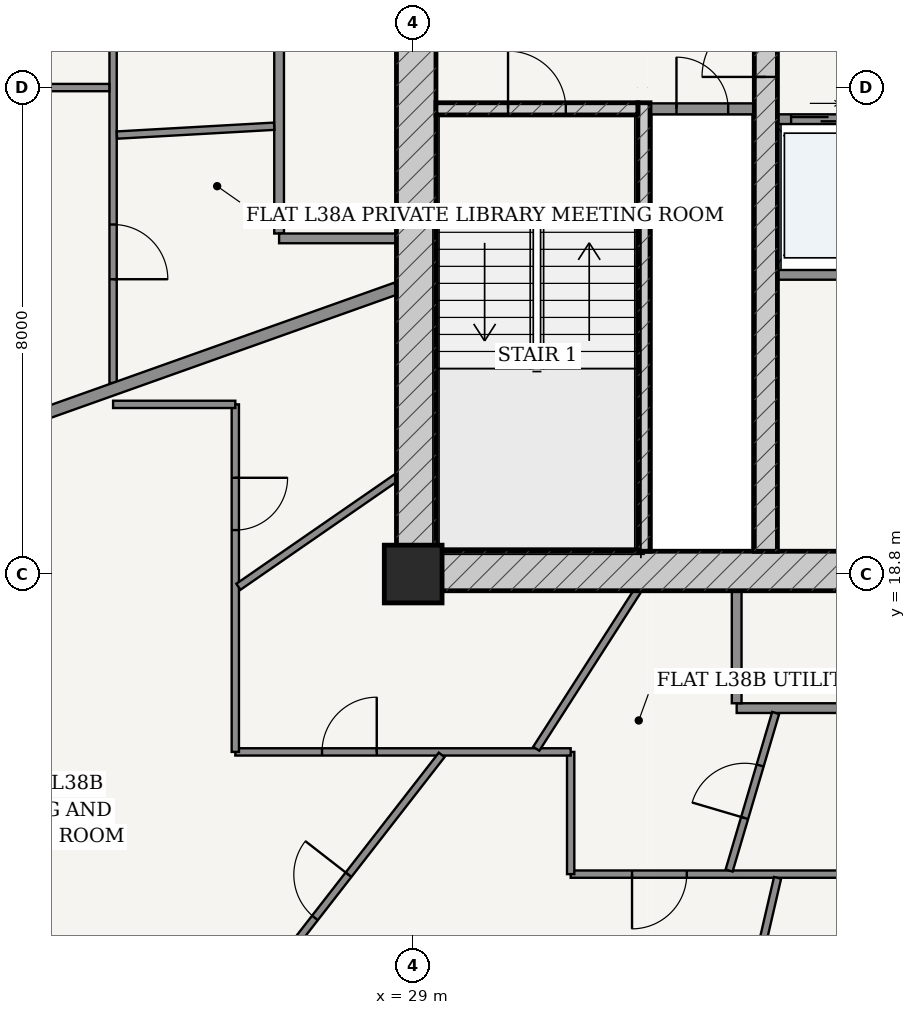
"""IFC4 building model, lengths in metres.
Left out: names, types, materials, properties, quantities, classifications, styles, units other than length and angle.
Written with IfcOpenShell. Run it as: python <this file> out.ifc"""

import sys

from ifc_helpers import new_model, si_unit, direction, frame, frame_2d, origin, origin_2d, place, context, subcontext, project, spatial, rectangle, extrude, source, transform, mapped, element, fill, save


model = new_model("IFC4")
c1 = context("Model", 3, precision=1e-05, world=origin(), true_north=direction((-0.2419218956, 0.970295726276)))
c2 = subcontext(c1, "Body", "Model", "MODEL_VIEW")
j1 = project(units=[si_unit("LENGTHUNIT", "METRE"), si_unit("PLANEANGLEUNIT", "RADIAN")], contexts=[c1])
p1 = place(None, origin())
s1 = spatial("IfcSite", under=j1, at=p1, CompositionType="ELEMENT")
p2 = place(p1, origin())
s2 = spatial("IfcBuilding", under=s1, at=p2, CompositionType="ELEMENT")
p3 = place(p2, frame((0.0, 0.0, 146.2)))
s3 = spatial("IfcBuildingStorey", under=s2, at=p3, CompositionType="ELEMENT", Elevation=146.2)
p4 = place(p3, frame((29.0, 18.8, 0.0), z_axis=(0.0, 0.0, 1.0), x_axis=(1.0, 0.0, 0.0)))
e1 = element("IfcColumn", 1, at=p4, inside=s3, PredefinedType="COLUMN", context=c2, shape_type="SweptSolid", body=[
    extrude(rectangle(XDim=0.95, YDim=0.95, at=origin_2d()), origin(), (0.0, 0.0, 1.0), 3.6),
])
p5 = place(p3, frame((28.725, 18.85, 0.0), z_axis=(0.0, 0.0, 1.0), x_axis=(1.0, 0.0, 0.0)))
e2 = element("IfcWall", 2, at=p5, inside=s3, PredefinedType="SHEAR", context=c2, shape_type="SweptSolid", body=[
    extrude(rectangle(XDim=18.55, YDim=0.65, at=frame_2d((9.275, 0.0))), origin(), (0.0, 0.0, 1.0), 3.33),
])
p6 = place(p5, frame((7.51, 0.0, 0.0)))
e3 = element("IfcOpeningElement", 3, at=p6, cuts=e2, PredefinedType="OPENING", context=c2, shape_type="SweptSolid", body=[
    extrude(rectangle(XDim=0.85, YDim=2.1, at=frame_2d((0.425, 1.05))), frame((0.0, 0.335, 0.0), z_axis=(0.0, -1.0, 0.0), x_axis=(1.0, 0.0, 0.0)), (0.0, 0.0, 1.0), 0.67),
])
p7 = place(p5, frame((10.59, 0.0, 0.0)))
e4 = element("IfcOpeningElement", 4, at=p7, cuts=e2, PredefinedType="OPENING", context=c2, shape_type="SweptSolid", body=[
    extrude(rectangle(XDim=0.85, YDim=2.1, at=frame_2d((0.425, 1.05))), frame((0.0, 0.335, 0.0), z_axis=(0.0, -1.0, 0.0), x_axis=(1.0, 0.0, 0.0)), (0.0, 0.0, 1.0), 0.67),
])
p8 = place(p3, frame((29.05, 19.175, 0.0), z_axis=(0.0, 0.0, 1.0), x_axis=(0.0, 1.0, 0.0)))
e5 = element("IfcWall", 5, at=p8, inside=s3, PredefinedType="SHEAR", context=c2, shape_type="SweptSolid", body=[
    extrude(rectangle(XDim=15.25, YDim=0.65, at=frame_2d((7.625, 0.0))), origin(), (0.0, 0.0, 1.0), 3.33),
])
p9 = place(p8, frame((9.875, 0.0, 0.0)))
e6 = element("IfcOpeningElement", 6, at=p9, cuts=e5, PredefinedType="OPENING", context=c2, shape_type="SweptSolid", body=[
    extrude(rectangle(XDim=1.5, YDim=2.2, at=frame_2d((0.75, 1.1))), frame((0.0, 0.335, 0.0), z_axis=(0.0, -1.0, 0.0), x_axis=(1.0, 0.0, 0.0)), (0.0, 0.0, 1.0), 0.67),
])
p10 = place(p3, frame((32.795, 19.175, 0.0), z_axis=(0.0, 0.0, 1.0), x_axis=(0.0, 1.0, 0.0)))
e7 = element("IfcWall", 7, at=p10, inside=s3, PredefinedType="SOLIDWALL", context=c2, shape_type="SweptSolid", body=[
    extrude(rectangle(XDim=7.375, YDim=0.2, at=frame_2d((3.688, 0.0))), origin(), (0.0, 0.0, 1.0), 3.33),
])
p11 = place(p3, frame((29.375, 26.45, 0.0), z_axis=(0.0, 0.0, 1.0), x_axis=(1.0, 0.0, 0.0)))
e8 = element("IfcWall", 8, at=p11, inside=s3, PredefinedType="SOLIDWALL", context=c2, shape_type="SweptSolid", body=[
    extrude(rectangle(XDim=3.32, YDim=0.2, at=frame_2d((1.66, 0.0))), origin(), (0.0, 0.0, 1.0), 3.33),
])
p12 = place(p11, frame((1.185, 0.0, 0.0)))
e9 = element("IfcOpeningElement", 9, at=p12, cuts=e8, PredefinedType="OPENING", context=c2, shape_type="SweptSolid", body=[
    extrude(rectangle(XDim=0.95, YDim=2.15, at=frame_2d((0.475, 1.075))), frame((0.0, 0.11, 0.0), z_axis=(0.0, -1.0, 0.0), x_axis=(1.0, 0.0, 0.0)), (0.0, 0.0, 1.0), 0.22),
])
p13 = place(p3, frame((34.8, 19.175, 0.0), z_axis=(0.0, 0.0, 1.0), x_axis=(0.0, 1.0, 0.0)))
e10 = element("IfcWall", 10, at=p13, inside=s3, PredefinedType="SHEAR", context=c2, shape_type="SweptSolid", body=[
    extrude(rectangle(XDim=15.25, YDim=0.38, at=frame_2d((7.625, 0.0))), origin(), (0.0, 0.0, 1.0), 3.33),
])
p14 = place(p13, frame((7.8, 0.0, 0.0)))
e11 = element("IfcOpeningElement", 11, at=p14, cuts=e10, PredefinedType="OPENING", context=c2, shape_type="SweptSolid", body=[
    extrude(rectangle(XDim=1.05, YDim=2.15, at=frame_2d((0.525, 1.075))), frame((0.0, 0.2, 0.0), z_axis=(0.0, -1.0, 0.0), x_axis=(1.0, 0.0, 0.0)), (0.0, 0.0, 1.0), 0.4),
])
p15 = place(p3, frame((32.9, 26.45, 0.0), z_axis=(0.0, 0.0, 1.0), x_axis=(1.0, 0.0, 0.0)))
e12 = element("IfcWall", 12, at=p15, inside=s3, PredefinedType="PARTITIONING", context=c2, shape_type="SweptSolid", body=[
    extrude(rectangle(XDim=1.71, YDim=0.18, at=frame_2d((0.855, 0.0))), origin(), (0.0, 0.0, 1.0), 3.33),
])
p16 = place(p15, frame((0.43, 0.0, 0.0)))
e13 = element("IfcOpeningElement", 13, at=p16, cuts=e12, PredefinedType="OPENING", context=c2, shape_type="SweptSolid", body=[
    extrude(rectangle(XDim=0.85, YDim=2.1, at=frame_2d((0.425, 1.05))), frame((0.0, 0.1, 0.0), z_axis=(0.0, -1.0, 0.0), x_axis=(1.0, 0.0, 0.0)), (0.0, 0.0, 1.0), 0.2),
])
p17 = place(p3, frame((34.99, 26.28, 0.0), z_axis=(0.0, 0.0, 1.0), x_axis=(1.0, 0.0, 0.0)))
e14 = element("IfcWall", 14, at=p17, inside=s3, PredefinedType="PARTITIONING", context=c2, shape_type="SweptSolid", body=[
    extrude(rectangle(XDim=6.02, YDim=0.16, at=frame_2d((3.01, 0.0))), origin(), (0.0, 0.0, 1.0), 3.33),
])
p18 = place(p17, frame((0.225, 0.0, 0.0)))
e15 = element("IfcOpeningElement", 15, at=p18, cuts=e14, PredefinedType="OPENING", context=c2, shape_type="SweptSolid", body=[
    extrude(rectangle(XDim=1.1, YDim=2.2, at=frame_2d((0.55, 1.1))), frame((0.0, 0.09, 0.0), z_axis=(0.0, -1.0, 0.0), x_axis=(1.0, 0.0, 0.0)), (0.0, 0.0, 1.0), 0.18),
])
p19 = place(p17, frame((1.705, 0.0, 0.0)))
e16 = element("IfcOpeningElement", 16, at=p19, cuts=e14, PredefinedType="OPENING", context=c2, shape_type="SweptSolid", body=[
    extrude(rectangle(XDim=1.1, YDim=2.2, at=frame_2d((0.55, 1.1))), frame((0.0, 0.09, 0.0), z_axis=(0.0, -1.0, 0.0), x_axis=(1.0, 0.0, 0.0)), (0.0, 0.0, 1.0), 0.18),
])
p20 = place(p3, frame((34.99, 23.72, 0.0), z_axis=(0.0, 0.0, 1.0), x_axis=(1.0, 0.0, 0.0)))
e17 = element("IfcWall", 17, at=p20, inside=s3, PredefinedType="PARTITIONING", context=c2, shape_type="SweptSolid", body=[
    extrude(rectangle(XDim=6.02, YDim=0.16, at=frame_2d((3.01, 0.0))), origin(), (0.0, 0.0, 1.0), 3.33),
])
p21 = place(p3, frame((26.795, 24.4, 0.0), z_axis=(0.0, 0.0, 1.0), x_axis=(0.0, 1.0, 0.0)))
e18 = element("IfcWall", 18, at=p21, inside=s3, PredefinedType="PARTITIONING", context=c2, shape_type="SweptSolid", body=[
    extrude(rectangle(XDim=10.675, YDim=0.16, at=frame_2d((5.337, 0.0))), origin(), (0.0, 0.0, 1.0), 2.776),
])
p22 = place(p21, frame((6.702, 0.0, 0.0)))
e19 = element("IfcOpeningElement", 19, at=p22, cuts=e18, PredefinedType="OPENING", context=c2, shape_type="SweptSolid", body=[
    extrude(rectangle(XDim=0.98, YDim=2.2, at=frame_2d((0.49, 1.1))), frame((0.0, 0.09, 0.0), z_axis=(0.0, -1.0, 0.0), x_axis=(1.0, 0.0, 0.0)), (0.0, 0.0, 1.0), 0.18),
])
p23 = place(p3, frame((26.795, 24.32, 0.0), z_axis=(0.0, 0.0, 1.0), x_axis=(1.0, 0.0, 0.0)))
e20 = element("IfcWall", 20, at=p23, inside=s3, PredefinedType="PARTITIONING", context=c2, shape_type="SweptSolid", body=[
    extrude(rectangle(XDim=1.93, YDim=0.16, at=frame_2d((0.965, 0.0))), origin(), (0.0, 0.0, 1.0), 3.33),
])
p24 = place(p3, frame((34.32, 16.595, 0.0), z_axis=(0.0, 0.0, 1.0), x_axis=(1.0, 0.0, 0.0)))
e21 = element("IfcWall", 21, at=p24, inside=s3, PredefinedType="PARTITIONING", context=c2, shape_type="SweptSolid", body=[
    extrude(rectangle(XDim=14.885, YDim=0.16, at=frame_2d((7.442, 0.0))), origin(), (0.0, 0.0, 1.0), 2.776),
])
p25 = place(p24, frame((11.609, 0.0, 0.0)))
e22 = element("IfcOpeningElement", 22, at=p25, cuts=e21, PredefinedType="OPENING", context=c2, shape_type="SweptSolid", body=[
    extrude(rectangle(XDim=0.98, YDim=2.2, at=frame_2d((0.49, 1.1))), frame((0.0, 0.09, 0.0), z_axis=(0.0, -1.0, 0.0), x_axis=(1.0, 0.0, 0.0)), (0.0, 0.0, 1.0), 0.18),
])
p26 = place(p3, frame((34.32, 16.675, 0.0), z_axis=(0.0, 0.0, 1.0), x_axis=(0.0, 1.0, 0.0)))
e23 = element("IfcWall", 23, at=p26, inside=s3, PredefinedType="PARTITIONING", context=c2, shape_type="SweptSolid", body=[
    extrude(rectangle(XDim=1.85, YDim=0.16, at=frame_2d((0.925, 0.0))), origin(), (0.0, 0.0, 1.0), 3.33),
])
p27 = place(p3, frame((24.065, 21.941, 0.0), z_axis=(0.0, 0.0, 1.0), x_axis=(0.0, 1.0, 0.0)))
e24 = element("IfcWall", 24, at=p27, inside=s3, PredefinedType="PARTITIONING", context=c2, shape_type="SweptSolid", body=[
    extrude(rectangle(XDim=15.944, YDim=0.12, at=frame_2d((7.972, 0.0))), origin(), (0.0, 0.0, 1.0), 2.776),
])
p28 = place(p27, frame((5.602, 0.0, 0.0)))
e25 = element("IfcOpeningElement", 25, at=p28, cuts=e24, PredefinedType="OPENING", context=c2, shape_type="SweptSolid", body=[
    extrude(rectangle(XDim=0.9, YDim=2.15, at=frame_2d((0.45, 1.075))), frame((0.0, 0.07, 0.0), z_axis=(0.0, -1.0, 0.0), x_axis=(1.0, 0.0, 0.0)), (0.0, 0.0, 1.0), 0.14),
])
p29 = place(p27, frame((1.707, 0.0, 0.0)))
e26 = element("IfcOpeningElement", 26, at=p29, cuts=e24, PredefinedType="OPENING", context=c2, shape_type="SweptSolid", body=[
    extrude(rectangle(XDim=0.9, YDim=2.15, at=frame_2d((0.45, 1.075))), frame((0.0, 0.07, 0.0), z_axis=(0.0, -1.0, 0.0), x_axis=(1.0, 0.0, 0.0)), (0.0, 0.0, 1.0), 0.14),
])
p30 = place(p27, frame((11.402, 0.0, 0.0)))
e27 = element("IfcOpeningElement", 27, at=p30, cuts=e24, PredefinedType="OPENING", context=c2, shape_type="SweptSolid", body=[
    extrude(rectangle(XDim=0.9, YDim=2.15, at=frame_2d((0.45, 1.075))), frame((0.0, 0.07, 0.0), z_axis=(0.0, -1.0, 0.0), x_axis=(1.0, 0.0, 0.0)), (0.0, 0.0, 1.0), 0.14),
])
p31 = place(p3, frame((24.003, 26.8, 0.0), z_axis=(0.0, 0.0, 1.0), x_axis=(-1.0, 0.0, 0.0)))
e28 = element("IfcWall", 28, at=p31, inside=s3, PredefinedType="PARTITIONING", context=c2, shape_type="SweptSolid", body=[
    extrude(rectangle(XDim=10.143, YDim=0.12, at=frame_2d((5.071, 0.0))), origin(), (0.0, 0.0, 1.0), 2.846),
])
p32 = place(p31, frame((4.622, 0.0, 0.0)))
e29 = element("IfcOpeningElement", 29, at=p32, cuts=e28, PredefinedType="OPENING", context=c2, shape_type="SweptSolid", body=[
    extrude(rectangle(XDim=0.9, YDim=2.15, at=frame_2d((0.45, 1.075))), frame((0.0, 0.07, 0.0), z_axis=(0.0, -1.0, 0.0), x_axis=(1.0, 0.0, 0.0)), (0.0, 0.0, 1.0), 0.14),
])
p33 = place(p3, frame((26.715, 26.164, 0.0), z_axis=(0.0, 0.0, 1.0), x_axis=(-0.998418047295, -0.056226353574, 0.0)))
e30 = element("IfcWall", 30, at=p33, inside=s3, PredefinedType="PARTITIONING", context=c2, shape_type="SweptSolid", body=[
    extrude(rectangle(XDim=2.592, YDim=0.12, at=frame_2d((1.296, 0.0))), origin(), (0.0, 0.0, 1.0), 3.33),
])
p34 = place(p3, frame((28.723, 23.497, 0.0), z_axis=(0.0, 0.0, 1.0), x_axis=(-0.942077095572, -0.335396401292, 0.0)))
e31 = element("IfcWall", 31, at=p34, inside=s3, PredefinedType="PARTITIONING", context=c2, shape_type="SweptSolid", body=[
    extrude(rectangle(XDim=13.823, YDim=0.2, at=frame_2d((6.912, 0.0))), origin(), (0.0, 0.0, 1.0), 2.846),
])
p35 = place(p3, frame((51.935, 13.865, 0.0), z_axis=(0.0, 0.0, 1.0), x_axis=(-1.0, 0.0, 0.0)))
e32 = element("IfcWall", 32, at=p35, inside=s3, PredefinedType="PARTITIONING", context=c2, shape_type="SweptSolid", body=[
    extrude(rectangle(XDim=20.345, YDim=0.12, at=frame_2d((10.172, 0.0))), origin(), (0.0, 0.0, 1.0), 2.776),
])
p36 = place(p35, frame((2.985, 0.0, 0.0)))
e33 = element("IfcOpeningElement", 33, at=p36, cuts=e32, PredefinedType="OPENING", context=c2, shape_type="SweptSolid", body=[
    extrude(rectangle(XDim=0.9, YDim=2.15, at=frame_2d((0.45, 1.075))), frame((0.0, 0.07, 0.0), z_axis=(0.0, -1.0, 0.0), x_axis=(1.0, 0.0, 0.0)), (0.0, 0.0, 1.0), 0.14),
])
p37 = place(p35, frame((12.333, 0.0, 0.0)))
e34 = element("IfcOpeningElement", 34, at=p37, cuts=e32, PredefinedType="OPENING", context=c2, shape_type="SweptSolid", body=[
    extrude(rectangle(XDim=0.9, YDim=2.15, at=frame_2d((0.45, 1.075))), frame((0.0, 0.07, 0.0), z_axis=(0.0, -1.0, 0.0), x_axis=(1.0, 0.0, 0.0)), (0.0, 0.0, 1.0), 0.14),
])
p38 = place(p35, frame((18.436, 0.0, 0.0)))
e35 = element("IfcOpeningElement", 35, at=p38, cuts=e32, PredefinedType="OPENING", context=c2, shape_type="SweptSolid", body=[
    extrude(rectangle(XDim=0.9, YDim=2.15, at=frame_2d((0.45, 1.075))), frame((0.0, 0.07, 0.0), z_axis=(0.0, -1.0, 0.0), x_axis=(1.0, 0.0, 0.0)), (0.0, 0.0, 1.0), 0.14),
])
p39 = place(p3, frame((31.59, 13.865, 0.0), z_axis=(0.0, 0.0, 1.0), x_axis=(0.0, 1.0, 0.0)))
e36 = element("IfcWall", 36, at=p39, inside=s3, PredefinedType="PARTITIONING", context=c2, shape_type="SweptSolid", body=[
    extrude(rectangle(XDim=2.01, YDim=0.12, at=frame_2d((1.005, 0.0))), origin(), (0.0, 0.0, 1.0), 3.005),
])
p40 = place(p3, frame((31.59, 15.875, 0.0), z_axis=(0.0, 0.0, 1.0), x_axis=(-1.0, 0.0, 0.0)))
e37 = element("IfcWall", 37, at=p40, inside=s3, PredefinedType="PARTITIONING", context=c2, shape_type="SweptSolid", body=[
    extrude(rectangle(XDim=5.515, YDim=0.12, at=frame_2d((2.758, 0.0))), origin(), (0.0, 0.0, 1.0), 2.776),
])
p41 = place(p40, frame((3.189, 0.0, 0.0)))
e38 = element("IfcOpeningElement", 38, at=p41, cuts=e37, PredefinedType="OPENING", context=c2, shape_type="SweptSolid", body=[
    extrude(rectangle(XDim=0.9, YDim=2.15, at=frame_2d((0.45, 1.075))), frame((0.0, 0.07, 0.0), z_axis=(0.0, -1.0, 0.0), x_axis=(1.0, 0.0, 0.0)), (0.0, 0.0, 1.0), 0.14),
])
p42 = place(p3, frame((26.075, 15.875, 0.0), z_axis=(0.0, 0.0, 1.0), x_axis=(0.0, 1.0, 0.0)))
e39 = element("IfcWall", 39, at=p42, inside=s3, PredefinedType="PARTITIONING", context=c2, shape_type="SweptSolid", body=[
    extrude(rectangle(XDim=5.715, YDim=0.12, at=frame_2d((2.857, 0.0))), origin(), (0.0, 0.0, 1.0), 2.776),
])
p43 = place(p42, frame((3.648, 0.0, 0.0)))
e40 = element("IfcOpeningElement", 40, at=p43, cuts=e39, PredefinedType="OPENING", context=c2, shape_type="SweptSolid", body=[
    extrude(rectangle(XDim=0.86, YDim=2.15, at=frame_2d((0.43, 1.075))), frame((0.0, 0.07, 0.0), z_axis=(0.0, -1.0, 0.0), x_axis=(1.0, 0.0, 0.0)), (0.0, 0.0, 1.0), 0.14),
])
p44 = place(p3, frame((26.075, 21.59, 0.0), z_axis=(0.0, 0.0, 1.0), x_axis=(-1.0, 0.0, 0.0)))
e41 = element("IfcWall", 41, at=p44, inside=s3, PredefinedType="PARTITIONING", context=c2, shape_type="SweptSolid", body=[
    extrude(rectangle(XDim=2.01, YDim=0.12, at=frame_2d((1.005, 0.0))), origin(), (0.0, 0.0, 1.0), 3.33),
])
p45 = place(p3, frame((29.469, 15.826, 0.0), z_axis=(0.0, 0.0, 1.0), x_axis=(-0.61373942367, -0.789508657225, 0.0)))
e42 = element("IfcWall", 42, at=p45, inside=s3, PredefinedType="PARTITIONING", context=c2, shape_type="SweptSolid", body=[
    extrude(rectangle(XDim=7.898, YDim=0.12, at=frame_2d((3.949, 0.0))), origin(), (0.0, 0.0, 1.0), 2.776),
])
p46 = place(p45, frame((2.496, 0.0, 0.0)))
e43 = element("IfcOpeningElement", 43, at=p46, cuts=e42, PredefinedType="OPENING", context=c2, shape_type="SweptSolid", body=[
    extrude(rectangle(XDim=0.9, YDim=2.15, at=frame_2d((0.45, 1.075))), frame((0.0, 0.07, 0.0), z_axis=(0.0, -1.0, 0.0), x_axis=(1.0, 0.0, 0.0)), (0.0, 0.0, 1.0), 0.14),
])
p47 = place(p3, frame((34.992, 13.805, 0.0), z_axis=(0.0, 0.0, 1.0), x_axis=(-0.225447000045, -0.974255433739, 0.0)))
e44 = element("IfcWall", 44, at=p47, inside=s3, PredefinedType="PARTITIONING", context=c2, shape_type="SweptSolid", body=[
    extrude(rectangle(XDim=7.496, YDim=0.12, at=frame_2d((3.748, 0.0))), origin(), (0.0, 0.0, 1.0), 2.776),
])
p48 = place(p3, frame((28.723, 20.386, 0.0), z_axis=(0.0, 0.0, 1.0), x_axis=(-0.822570551556, -0.568663070467, 0.0)))
e45 = element("IfcWall", 45, at=p48, inside=s3, PredefinedType="PARTITIONING", context=c2, shape_type="SweptSolid", body=[
    extrude(rectangle(XDim=3.158, YDim=0.12, at=frame_2d((1.579, 0.0))), origin(), (0.0, 0.0, 1.0), 3.33),
])
p49 = place(p3, frame((32.691, 18.525, 0.0), z_axis=(0.0, 0.0, 1.0), x_axis=(-0.54002976428, -0.841645919429, 0.0)))
e46 = element("IfcWall", 46, at=p49, inside=s3, PredefinedType="PARTITIONING", context=c2, shape_type="SweptSolid", body=[
    extrude(rectangle(XDim=3.086, YDim=0.12, at=frame_2d((1.543, 0.0))), origin(), (0.0, 0.0, 1.0), 3.33),
])
p50 = place(p3, frame((34.961, 16.515, 0.0), z_axis=(0.0, 0.0, 1.0), x_axis=(-0.283365034326, -0.959012125743, 0.0)))
e47 = element("IfcWall", 47, at=p50, inside=s3, PredefinedType="PARTITIONING", context=c2, shape_type="SweptSolid", body=[
    extrude(rectangle(XDim=2.701, YDim=0.12, at=frame_2d((1.351, 0.0))), origin(), (0.0, 0.0, 1.0), 3.33),
])
p51 = place(p50, frame((0.901, 0.0, 0.0)))
e48 = element("IfcOpeningElement", 48, at=p51, cuts=e47, PredefinedType="OPENING", context=c2, shape_type="SweptSolid", body=[
    extrude(rectangle(XDim=0.9, YDim=2.15, at=frame_2d((0.45, 1.075))), frame((0.0, 0.07, 0.0), z_axis=(0.0, -1.0, 0.0), x_axis=(1.0, 0.0, 0.0)), (0.0, 0.0, 1.0), 0.14),
])
m1 = source(origin(), c2, "Body", "SweptSolid", [
    extrude(rectangle(XDim=1.05, YDim=2.15, at=frame_2d((0.525, 1.075))), frame((0.0, 0.025, 0.0), z_axis=(0.0, -1.0, 0.0), x_axis=(1.0, 0.0, 0.0)), (0.0, 0.0, 1.0), 0.05),
])
p52 = place(p14, origin())
e49 = element("IfcDoor", 49, at=p52, inside=s3, OperationType="SINGLE_SWING_LEFT", PredefinedType="DOOR", context=c2, shape_type="MappedRepresentation", body=[
    mapped(m1, transform((0.0, 0.0, 0.0), scale=1.0)),
])
fill(e11, e49)
m2 = source(origin(), c2, "Body", "SweptSolid", [
    extrude(rectangle(XDim=0.95, YDim=2.15, at=frame_2d((0.475, 1.075))), frame((0.0, 0.025, 0.0), z_axis=(0.0, -1.0, 0.0), x_axis=(1.0, 0.0, 0.0)), (0.0, 0.0, 1.0), 0.05),
])
p53 = place(p12, origin())
e50 = element("IfcDoor", 50, at=p53, inside=s3, OperationType="SINGLE_SWING_LEFT", PredefinedType="DOOR", context=c2, shape_type="MappedRepresentation", body=[
    mapped(m2, transform((0.0, 0.0, 0.0), scale=1.0)),
])
fill(e9, e50)
m3 = source(origin(), c2, "Body", "SweptSolid", [
    extrude(rectangle(XDim=0.85, YDim=2.1, at=frame_2d((0.425, 1.05))), frame((0.0, 0.025, 0.0), z_axis=(0.0, -1.0, 0.0), x_axis=(1.0, 0.0, 0.0)), (0.0, 0.0, 1.0), 0.05),
])
p54 = place(p16, origin())
e51 = element("IfcDoor", 51, at=p54, inside=s3, OperationType="SINGLE_SWING_LEFT", PredefinedType="DOOR", context=c2, shape_type="MappedRepresentation", body=[
    mapped(m3, transform((0.0, 0.0, 0.0), scale=1.0)),
])
fill(e13, e51)
m4 = source(origin(), c2, "Body", "SweptSolid", [
    extrude(rectangle(XDim=1.1, YDim=2.2, at=frame_2d((0.55, 1.1))), frame((0.0, 0.025, 0.0), z_axis=(0.0, -1.0, 0.0), x_axis=(1.0, 0.0, 0.0)), (0.0, 0.0, 1.0), 0.05),
])
p55 = place(p18, origin())
e52 = element("IfcDoor", 52, at=p55, inside=s3, OperationType="DOUBLE_DOOR_SLIDING", PredefinedType="DOOR", context=c2, shape_type="MappedRepresentation", body=[
    mapped(m4, transform((0.0, 0.0, 0.0), scale=1.0)),
])
fill(e15, e52)
m5 = source(origin(), c2, "Body", "SweptSolid", [
    extrude(rectangle(XDim=0.9, YDim=2.15, at=frame_2d((0.45, 1.075))), frame((0.0, 0.025, 0.0), z_axis=(0.0, -1.0, 0.0), x_axis=(1.0, 0.0, 0.0)), (0.0, 0.0, 1.0), 0.05),
])
p56 = place(p29, frame((0.9, 0.0, 0.0), z_axis=(0.0, 0.0, 1.0), x_axis=(-1.0, 0.0, 0.0)))
e53 = element("IfcDoor", 53, at=p56, inside=s3, OperationType="SINGLE_SWING_RIGHT", PredefinedType="DOOR", context=c2, shape_type="MappedRepresentation", body=[
    mapped(m5, transform((0.0, 0.0, 0.0), scale=1.0)),
])
fill(e26, e53)
p57 = place(p51, frame((0.9, 0.0, 0.0), z_axis=(0.0, 0.0, 1.0), x_axis=(-1.0, 0.0, 0.0)))
e54 = element("IfcDoor", 54, at=p57, inside=s3, OperationType="SINGLE_SWING_LEFT", PredefinedType="DOOR", context=c2, shape_type="MappedRepresentation", body=[
    mapped(m5, transform((0.0, 0.0, 0.0), scale=1.0)),
])
fill(e48, e54)
p58 = place(p38, origin())
e55 = element("IfcDoor", 55, at=p58, inside=s3, OperationType="SINGLE_SWING_RIGHT", PredefinedType="DOOR", context=c2, shape_type="MappedRepresentation", body=[
    mapped(m5, transform((0.0, 0.0, 0.0), scale=1.0)),
])
fill(e35, e55)
p59 = place(p46, frame((0.9, 0.0, 0.0), z_axis=(0.0, 0.0, 1.0), x_axis=(-1.0, 0.0, 0.0)))
e56 = element("IfcDoor", 56, at=p59, inside=s3, OperationType="SINGLE_SWING_RIGHT", PredefinedType="DOOR", context=c2, shape_type="MappedRepresentation", body=[
    mapped(m5, transform((0.0, 0.0, 0.0), scale=1.0)),
])
fill(e43, e56)
m6 = source(origin(), c2, "Body", "SweptSolid", [
    extrude(rectangle(XDim=0.86, YDim=2.15, at=frame_2d((0.43, 1.075))), frame((0.0, 0.025, 0.0), z_axis=(0.0, -1.0, 0.0), x_axis=(1.0, 0.0, 0.0)), (0.0, 0.0, 1.0), 0.05),
])
p60 = place(p43, frame((0.86, 0.0, 0.0), z_axis=(0.0, 0.0, 1.0), x_axis=(-1.0, 0.0, 0.0)))
e57 = element("IfcDoor", 57, at=p60, inside=s3, OperationType="SINGLE_SWING_LEFT", PredefinedType="DOOR", context=c2, shape_type="MappedRepresentation", body=[
    mapped(m6, transform((0.0, 0.0, 0.0), scale=1.0)),
])
fill(e40, e57)
p61 = place(p41, frame((0.9, 0.0, 0.0), z_axis=(0.0, 0.0, 1.0), x_axis=(-1.0, 0.0, 0.0)))
e58 = element("IfcDoor", 58, at=p61, inside=s3, OperationType="SINGLE_SWING_RIGHT", PredefinedType="DOOR", context=c2, shape_type="MappedRepresentation", body=[
    mapped(m5, transform((0.0, 0.0, 0.0), scale=1.0)),
])
fill(e38, e58)
save(model, sys.argv[1])
